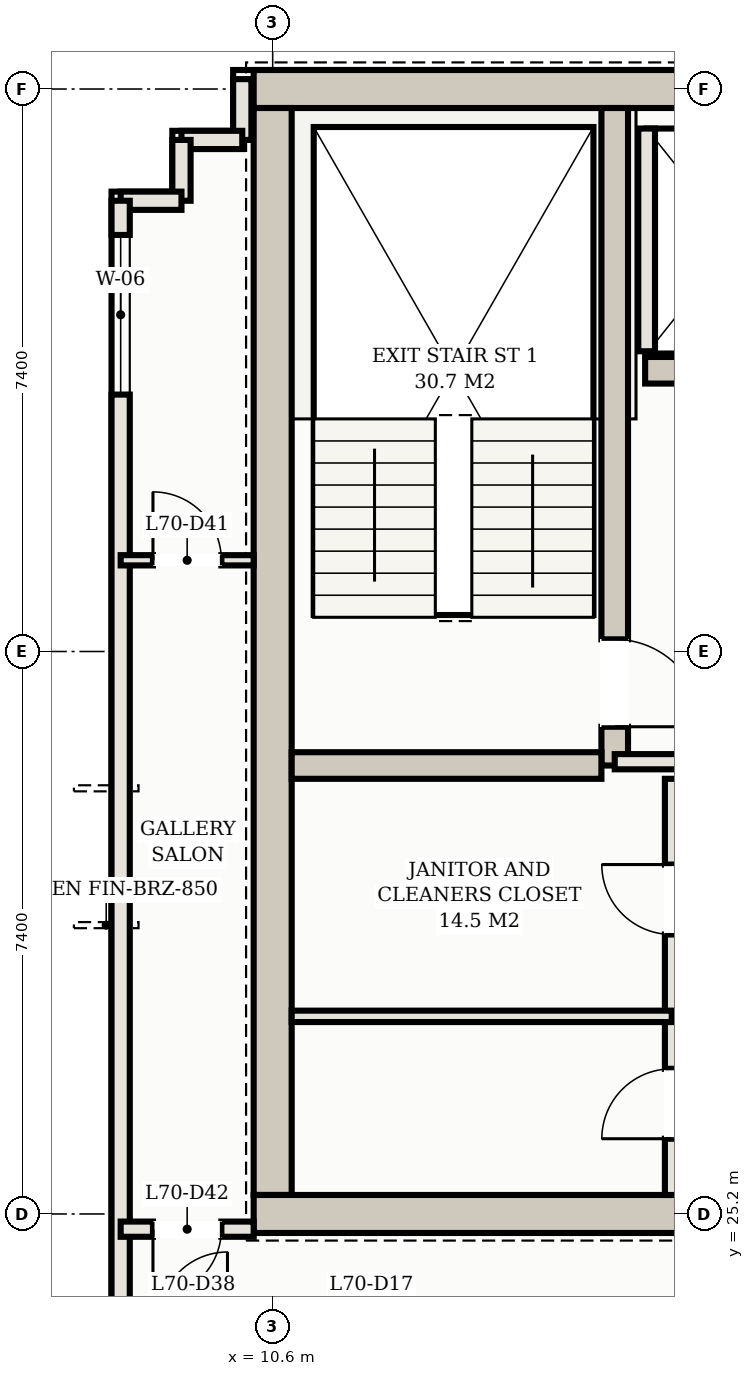
"""IFC4 building model, lengths in metres.
Left out: names, types, materials, properties, quantities, classifications, styles, units other than length and angle.
Written with IfcOpenShell. Run it as: python <this file> out.ifc"""

import sys

from ifc_helpers import new_model, si_unit, direction, frame, frame_2d, origin, place, context, subcontext, project, spatial, rectangle, extrude, element, fill, save


model = new_model("IFC4")
c1 = context("Model", 3, precision=1e-05, world=origin(), true_north=direction((0.0, 1.0)))
c2 = subcontext(c1, "Body", "Model", "MODEL_VIEW")
j1 = project(units=[si_unit("LENGTHUNIT", "METRE"), si_unit("PLANEANGLEUNIT", "RADIAN")], contexts=[c1])
p1 = place(None, origin())
s1 = spatial("IfcSite", under=j1, at=p1, CompositionType="ELEMENT")
p2 = place(p1, origin())
s2 = spatial("IfcBuilding", under=s1, at=p2, CompositionType="ELEMENT")
p3 = place(p2, frame((0.0, 0.0, 252.8)))
s3 = spatial("IfcBuildingStorey", under=s2, at=p3, CompositionType="ELEMENT", Elevation=252.8)
p4 = place(p3, frame((10.35, 40.0, 0.0), z_axis=(0.0, 0.0, 1.0), x_axis=(1.0, 0.0, 0.0)))
e1 = element("IfcWall", 1, at=p4, inside=s3, PredefinedType="SHEAR", context=c2, shape_type="SweptSolid", body=[
    extrude(rectangle(XDim=32.3, YDim=0.5, at=frame_2d((16.15, 0.0))), origin(), (0.0, 0.0, 1.0), 3.11),
])
p5 = place(p3, frame((10.6, 25.45, 0.0), z_axis=(0.0, 0.0, 1.0), x_axis=(0.0, 1.0, 0.0)))
e2 = element("IfcWall", 2, at=p5, inside=s3, PredefinedType="SHEAR", context=c2, shape_type="SweptSolid", body=[
    extrude(rectangle(XDim=14.3, YDim=0.5, at=frame_2d((7.15, 0.0))), origin(), (0.0, 0.0, 1.0), 3.11),
])
p6 = place(p3, frame((10.35, 25.2, 0.0), z_axis=(0.0, 0.0, 1.0), x_axis=(1.0, 0.0, 0.0)))
e3 = element("IfcWall", 3, at=p6, inside=s3, PredefinedType="SHEAR", context=c2, shape_type="SweptSolid", body=[
    extrude(rectangle(XDim=8.05, YDim=0.5, at=frame_2d((4.025, 0.0))), origin(), (0.0, 0.0, 1.0), 3.11),
])
p7 = place(p6, frame((6.15, 0.0, 0.0)))
e4 = element("IfcOpeningElement", 4, at=p7, cuts=e3, PredefinedType="OPENING", context=c2, shape_type="SweptSolid", body=[
    extrude(rectangle(XDim=1.25, YDim=2.2, at=frame_2d((0.625, 1.1))), frame((0.0, 0.26, 0.0), z_axis=(0.0, -1.0, 0.0), x_axis=(1.0, 0.0, 0.0)), (0.0, 0.0, 1.0), 0.52),
])
p8 = place(p3, frame((15.1, 31.1, 0.0), z_axis=(0.0, 0.0, 1.0), x_axis=(0.0, 1.0, 0.0)))
e5 = element("IfcWall", 5, at=p8, inside=s3, PredefinedType="SHEAR", context=c2, shape_type="SweptSolid", body=[
    extrude(rectangle(XDim=8.65, YDim=0.35, at=frame_2d((4.325, 0.0))), origin(), (0.0, 0.0, 1.0), 3.11),
])
p9 = place(p8, frame((0.51, 0.0, 0.0)))
e6 = element("IfcOpeningElement", 6, at=p9, cuts=e5, PredefinedType="OPENING", context=c2, shape_type="SweptSolid", body=[
    extrude(rectangle(XDim=1.15, YDim=2.2, at=frame_2d((0.575, 1.1))), frame((0.0, 0.185, 0.0), z_axis=(0.0, -1.0, 0.0), x_axis=(1.0, 0.0, 0.0)), (0.0, 0.0, 1.0), 0.37),
])
p10 = place(p3, frame((10.85, 31.1, 0.0), z_axis=(0.0, 0.0, 1.0), x_axis=(1.0, 0.0, 0.0)))
e7 = element("IfcWall", 7, at=p10, inside=s3, PredefinedType="SHEAR", context=c2, shape_type="SweptSolid", body=[
    extrude(rectangle(XDim=4.075, YDim=0.35, at=frame_2d((2.038, 0.0))), origin(), (0.0, 0.0, 1.0), 3.11),
])
p11 = place(p3, frame((15.5, 36.3, 0.0), z_axis=(0.0, 0.0, 1.0), x_axis=(1.0, 0.0, 0.0)))
e8 = element("IfcWall", 8, at=p11, inside=s3, PredefinedType="SHEAR", context=c2, shape_type="SweptSolid", body=[
    extrude(rectangle(XDim=22.0, YDim=0.35, at=frame_2d((11.0, 0.0))), origin(), (0.0, 0.0, 1.0), 3.11),
])
p12 = place(p11, frame((0.65, 0.0, 0.0)))
e9 = element("IfcOpeningElement", 9, at=p12, cuts=e8, PredefinedType="OPENING", context=c2, shape_type="SweptSolid", body=[
    extrude(rectangle(XDim=1.1, YDim=2.15, at=frame_2d((0.55, 1.075))), frame((0.0, 0.185, 0.0), z_axis=(0.0, -1.0, 0.0), x_axis=(1.0, 0.0, 0.0)), (0.0, 0.0, 1.0), 0.37),
])
p13 = place(p11, frame((20.25, 0.0, 0.0)))
e10 = element("IfcOpeningElement", 10, at=p13, cuts=e8, PredefinedType="OPENING", context=c2, shape_type="SweptSolid", body=[
    extrude(rectangle(XDim=1.1, YDim=2.15, at=frame_2d((0.55, 1.075))), frame((0.0, 0.185, 0.0), z_axis=(0.0, -1.0, 0.0), x_axis=(1.0, 0.0, 0.0)), (0.0, 0.0, 1.0), 0.37),
])
p14 = place(p11, frame((17.05, 0.0, 0.0)))
e11 = element("IfcOpeningElement", 11, at=p14, cuts=e8, PredefinedType="OPENING", context=c2, shape_type="SweptSolid", body=[
    extrude(rectangle(XDim=1.3, YDim=2.2, at=frame_2d((0.65, 1.1))), frame((0.0, 0.185, 0.0), z_axis=(0.0, -1.0, 0.0), x_axis=(1.0, 0.0, 0.0)), (0.0, 0.0, 1.0), 0.37),
])
p15 = place(p11, frame((3.95, 0.0, 0.0)))
e12 = element("IfcOpeningElement", 12, at=p15, cuts=e8, PredefinedType="OPENING", context=c2, shape_type="SweptSolid", body=[
    extrude(rectangle(XDim=1.1, YDim=2.15, at=frame_2d((0.55, 1.075))), frame((0.0, 0.185, 0.0), z_axis=(0.0, -1.0, 0.0), x_axis=(1.0, 0.0, 0.0)), (0.0, 0.0, 1.0), 0.37),
])
p16 = place(p11, frame((6.55, 0.0, 0.0)))
e13 = element("IfcOpeningElement", 13, at=p16, cuts=e8, PredefinedType="OPENING", context=c2, shape_type="SweptSolid", body=[
    extrude(rectangle(XDim=1.1, YDim=2.15, at=frame_2d((0.55, 1.075))), frame((0.0, 0.185, 0.0), z_axis=(0.0, -1.0, 0.0), x_axis=(1.0, 0.0, 0.0)), (0.0, 0.0, 1.0), 0.37),
])
p17 = place(p11, frame((9.15, 0.0, 0.0)))
e14 = element("IfcOpeningElement", 14, at=p17, cuts=e8, PredefinedType="OPENING", context=c2, shape_type="SweptSolid", body=[
    extrude(rectangle(XDim=1.1, YDim=2.15, at=frame_2d((0.55, 1.075))), frame((0.0, 0.185, 0.0), z_axis=(0.0, -1.0, 0.0), x_axis=(1.0, 0.0, 0.0)), (0.0, 0.0, 1.0), 0.37),
])
p18 = place(p3, frame((15.52, 36.55, 0.0), z_axis=(0.0, 0.0, 1.0), x_axis=(0.0, 1.0, 0.0)))
e15 = element("IfcWall", 15, at=p18, inside=s3, PredefinedType="SOLIDWALL", context=c2, shape_type="SweptSolid", body=[
    extrude(rectangle(XDim=2.93, YDim=0.22, at=frame_2d((1.465, 0.0))), origin(), (0.0, 0.0, 1.0), 3.11),
])
p19 = place(p3, frame((10.2, 40.13, 0.0), z_axis=(0.0, 0.0, 1.0), x_axis=(0.0, -1.0, 0.0)))
e16 = element("IfcWall", 16, at=p19, inside=s3, PredefinedType="SOLIDWALL", context=c2, shape_type="SweptSolid", body=[
    extrude(rectangle(XDim=0.8, YDim=0.24, at=frame_2d((0.4, 0.0))), origin(), (0.0, 0.0, 1.0), 3.11),
])
for number, where, z_axis, x_axis in (
    (17, (10.2, 39.33, 0.0), (0.0, 0.0, 1.0), (-1.0, 0.0, 0.0)),
    (18, (9.4, 39.33, 0.0), (0.0, 0.0, 1.0), (0.0, -1.0, 0.0)),
):
    element("IfcWall", number, at=place(p3, frame(where, z_axis=z_axis, x_axis=x_axis)), inside=s3, PredefinedType="SOLIDWALL", context=c2, shape_type="SweptSolid", body=[
        extrude(rectangle(XDim=0.8, YDim=0.24, at=frame_2d((0.4, 0.0))), origin(), (0.0, 0.0, 1.0), 3.11),
    ])
p20 = place(p3, frame((9.4, 38.53, 0.0), z_axis=(0.0, 0.0, 1.0), x_axis=(-1.0, 0.0, 0.0)))
e19 = element("IfcWall", 19, at=p20, inside=s3, PredefinedType="SOLIDWALL", context=c2, shape_type="SweptSolid", body=[
    extrude(rectangle(XDim=0.8, YDim=0.24, at=frame_2d((0.4, 0.0))), origin(), (0.0, 0.0, 1.0), 3.11),
])
p21 = place(p3, frame((8.6, 38.53, 0.0), z_axis=(0.0, 0.0, 1.0), x_axis=(0.0, -1.0, 0.0)))
e20 = element("IfcWall", 20, at=p21, inside=s3, PredefinedType="SOLIDWALL", context=c2, shape_type="SweptSolid", body=[
    extrude(rectangle(XDim=26.01, YDim=0.24, at=frame_2d((13.005, 0.0))), origin(), (0.0, 0.0, 1.0), 3.11),
])
p22 = place(p21, frame((19.73, 0.0, 0.0)))
e21 = element("IfcOpeningElement", 21, at=p22, cuts=e20, PredefinedType="OPENING", context=c2, shape_type="SweptSolid", body=[
    extrude(rectangle(XDim=1.8, YDim=2.2, at=frame_2d((0.9, 1.1))), frame((0.0, 0.13, 0.0), z_axis=(0.0, -1.0, 0.0), x_axis=(1.0, 0.0, 0.0)), (0.0, 0.0, 1.0), 0.26),
])
p23 = place(p21, frame((0.45, 0.0, 0.75)))
e22 = element("IfcOpeningElement", 22, at=p23, cuts=e20, PredefinedType="OPENING", context=c2, shape_type="SweptSolid", body=[
    extrude(rectangle(XDim=2.1, YDim=1.65, at=frame_2d((1.05, 0.825))), frame((0.0, 0.13, 0.0), z_axis=(0.0, -1.0, 0.0), x_axis=(1.0, 0.0, 0.0)), (0.0, 0.0, 1.0), 0.26),
])
p24 = place(p3, frame((15.1, 31.15, 0.0), z_axis=(0.0, 0.0, 1.0), x_axis=(1.0, 0.0, 0.0)))
e23 = element("IfcWall", 23, at=p24, inside=s3, PredefinedType="PARTITIONING", context=c2, shape_type="SweptSolid", body=[
    extrude(rectangle(XDim=3.25, YDim=0.2, at=frame_2d((1.625, 0.0))), origin(), (0.0, 0.0, 1.0), 2.45),
])
p25 = place(p24, frame((1.275, 0.0, 0.0)))
e24 = element("IfcOpeningElement", 24, at=p25, cuts=e23, PredefinedType="OPENING", context=c2, shape_type="SweptSolid", body=[
    extrude(rectangle(XDim=1.25, YDim=2.2, at=frame_2d((0.625, 1.1))), frame((0.0, 0.11, 0.0), z_axis=(0.0, -1.0, 0.0), x_axis=(1.0, 0.0, 0.0)), (0.0, 0.0, 1.0), 0.22),
])
p26 = place(p3, frame((15.85, 25.45, 0.0), z_axis=(0.0, 0.0, 1.0), x_axis=(0.0, 1.0, 0.0)))
e25 = element("IfcWall", 25, at=p26, inside=s3, PredefinedType="PARTITIONING", context=c2, shape_type="SweptSolid", body=[
    extrude(rectangle(XDim=5.475, YDim=0.18, at=frame_2d((2.738, 0.0))), origin(), (0.0, 0.0, 1.0), 2.45),
])
p27 = place(p26, frame((0.74, 0.0, 0.0)))
e26 = element("IfcOpeningElement", 26, at=p27, cuts=e25, PredefinedType="OPENING", context=c2, shape_type="SweptSolid", body=[
    extrude(rectangle(XDim=0.92, YDim=2.15, at=frame_2d((0.46, 1.075))), frame((0.0, 0.1, 0.0), z_axis=(0.0, -1.0, 0.0), x_axis=(1.0, 0.0, 0.0)), (0.0, 0.0, 1.0), 0.2),
])
p28 = place(p26, frame((3.427, 0.0, 0.0)))
e27 = element("IfcOpeningElement", 27, at=p28, cuts=e25, PredefinedType="OPENING", context=c2, shape_type="SweptSolid", body=[
    extrude(rectangle(XDim=0.92, YDim=2.15, at=frame_2d((0.46, 1.075))), frame((0.0, 0.1, 0.0), z_axis=(0.0, -1.0, 0.0), x_axis=(1.0, 0.0, 0.0)), (0.0, 0.0, 1.0), 0.2),
])
p29 = place(p3, frame((10.85, 27.8, 0.0), z_axis=(0.0, 0.0, 1.0), x_axis=(1.0, 0.0, 0.0)))
e28 = element("IfcWall", 28, at=p29, inside=s3, PredefinedType="PARTITIONING", context=c2, shape_type="SweptSolid", body=[
    extrude(rectangle(XDim=5.0, YDim=0.15, at=frame_2d((2.5, 0.0))), origin(), (0.0, 0.0, 1.0), 2.45),
])
p30 = place(p3, frame((8.6, 25.0, 0.0), z_axis=(0.0, 0.0, 1.0), x_axis=(1.0, 0.0, 0.0)))
e29 = element("IfcWall", 29, at=p30, inside=s3, PredefinedType="PARTITIONING", context=c2, shape_type="SweptSolid", body=[
    extrude(rectangle(XDim=1.75, YDim=0.2, at=frame_2d((0.875, 0.0))), origin(), (0.0, 0.0, 1.0), 2.45),
])
p31 = place(p30, frame((0.425, 0.0, 0.0)))
e30 = element("IfcOpeningElement", 30, at=p31, cuts=e29, PredefinedType="OPENING", context=c2, shape_type="SweptSolid", body=[
    extrude(rectangle(XDim=0.9, YDim=2.15, at=frame_2d((0.45, 1.075))), frame((0.0, 0.11, 0.0), z_axis=(0.0, -1.0, 0.0), x_axis=(1.0, 0.0, 0.0)), (0.0, 0.0, 1.0), 0.22),
])
p32 = place(p3, frame((8.6, 33.8, 0.0), z_axis=(0.0, 0.0, 1.0), x_axis=(1.0, 0.0, 0.0)))
e31 = element("IfcWall", 31, at=p32, inside=s3, PredefinedType="PARTITIONING", context=c2, shape_type="SweptSolid", body=[
    extrude(rectangle(XDim=1.75, YDim=0.135, at=frame_2d((0.875, 0.0))), origin(), (0.0, 0.0, 1.0), 2.45),
])
p33 = place(p32, frame((0.425, 0.0, 0.0)))
e32 = element("IfcOpeningElement", 32, at=p33, cuts=e31, PredefinedType="OPENING", context=c2, shape_type="SweptSolid", body=[
    extrude(rectangle(XDim=0.9, YDim=2.15, at=frame_2d((0.45, 1.075))), frame((0.0, 0.078, 0.0), z_axis=(0.0, -1.0, 0.0), x_axis=(1.0, 0.0, 0.0)), (0.0, 0.0, 1.0), 0.155),
])
p34 = place(p23, origin())
e33 = element("IfcWindow", 33, at=p34, inside=s3, PartitioningType="SINGLE_PANEL", PredefinedType="WINDOW", context=c2, shape_type="SweptSolid", body=[
    extrude(rectangle(XDim=2.1, YDim=1.65, at=frame_2d((1.05, 0.825))), frame((0.0, 0.03, 0.0), z_axis=(0.0, -1.0, 0.0), x_axis=(1.0, 0.0, 0.0)), (0.0, 0.0, 1.0), 0.06),
])
fill(e22, e33)
p35 = place(p9, frame((1.15, 0.0, 0.0), z_axis=(0.0, 0.0, 1.0), x_axis=(-1.0, 0.0, 0.0)))
e34 = element("IfcDoor", 34, at=p35, inside=s3, OperationType="SINGLE_SWING_RIGHT", PredefinedType="DOOR", context=c2, shape_type="SweptSolid", body=[
    extrude(rectangle(XDim=1.15, YDim=2.2, at=frame_2d((0.575, 1.1))), frame((0.0, 0.025, 0.0), z_axis=(0.0, -1.0, 0.0), x_axis=(1.0, 0.0, 0.0)), (0.0, 0.0, 1.0), 0.05),
])
fill(e6, e34)
p36 = place(p27, origin())
e35 = element("IfcDoor", 35, at=p36, inside=s3, OperationType="SINGLE_SWING_LEFT", PredefinedType="DOOR", context=c2, shape_type="SweptSolid", body=[
    extrude(rectangle(XDim=0.92, YDim=2.15, at=frame_2d((0.46, 1.075))), frame((0.0, 0.025, 0.0), z_axis=(0.0, -1.0, 0.0), x_axis=(1.0, 0.0, 0.0)), (0.0, 0.0, 1.0), 0.05),
])
fill(e26, e35)
p37 = place(p28, origin())
e36 = element("IfcDoor", 36, at=p37, inside=s3, OperationType="SINGLE_SWING_RIGHT", PredefinedType="DOOR", context=c2, shape_type="SweptSolid", body=[
    extrude(rectangle(XDim=0.92, YDim=2.15, at=frame_2d((0.46, 1.075))), frame((0.0, 0.025, 0.0), z_axis=(0.0, -1.0, 0.0), x_axis=(1.0, 0.0, 0.0)), (0.0, 0.0, 1.0), 0.05),
])
fill(e27, e36)
p38 = place(p33, origin())
e37 = element("IfcDoor", 37, at=p38, inside=s3, OperationType="SINGLE_SWING_LEFT", PredefinedType="DOOR", context=c2, shape_type="SweptSolid", body=[
    extrude(rectangle(XDim=0.9, YDim=2.15, at=frame_2d((0.45, 1.075))), frame((0.0, 0.025, 0.0), z_axis=(0.0, -1.0, 0.0), x_axis=(1.0, 0.0, 0.0)), (0.0, 0.0, 1.0), 0.05),
])
fill(e32, e37)
p39 = place(p31, frame((0.9, 0.0, 0.0), z_axis=(0.0, 0.0, 1.0), x_axis=(-1.0, 0.0, 0.0)))
e38 = element("IfcDoor", 38, at=p39, inside=s3, OperationType="SINGLE_SWING_RIGHT", PredefinedType="DOOR", context=c2, shape_type="SweptSolid", body=[
    extrude(rectangle(XDim=0.9, YDim=2.15, at=frame_2d((0.45, 1.075))), frame((0.0, 0.025, 0.0), z_axis=(0.0, -1.0, 0.0), x_axis=(1.0, 0.0, 0.0)), (0.0, 0.0, 1.0), 0.05),
])
fill(e30, e38)
save(model, sys.argv[1])
